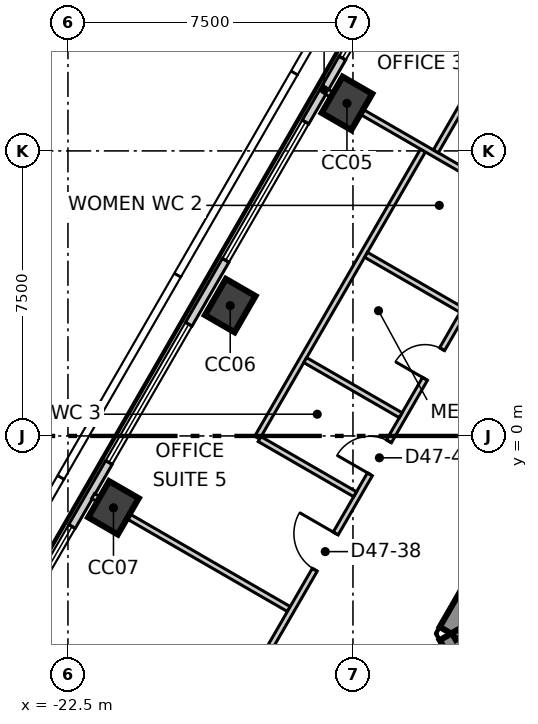
"""IFC4 building model, lengths in metres.
Left out: names, types, materials, properties, quantities, classifications, styles, units other than length and angle.
Written with IfcOpenShell. Run it as: python <this file> out.ifc"""

import sys

from ifc_helpers import new_model, si_unit, direction, frame, frame_2d, origin, origin_2d, place, context, subcontext, project, spatial, polyline, rectangle, outline, extrude, element, fill, save


model = new_model("IFC4")
c1 = context("Model", 3, precision=1e-05, world=origin(), true_north=direction((0.0, 1.0)))
c2 = subcontext(c1, "Body", "Model", "MODEL_VIEW")
j1 = project(units=[si_unit("LENGTHUNIT", "METRE"), si_unit("PLANEANGLEUNIT", "RADIAN")], contexts=[c1])
p1 = place(None, origin())
s1 = spatial("IfcSite", under=j1, at=p1, CompositionType="ELEMENT")
p2 = place(p1, origin())
s2 = spatial("IfcBuilding", under=s1, at=p2, CompositionType="ELEMENT")
p3 = place(p2, frame((0.0, 0.0, 203.3)))
s3 = spatial("IfcBuildingStorey", under=s2, at=p3, CompositionType="ELEMENT", Elevation=203.3)
p4 = place(p3, frame((-1.703, 13.35, -0.3), z_axis=(0.0, 0.0, 1.0), x_axis=(-0.500011533395, -0.866018744874, 0.0)))
e1 = element("IfcWall", 1, at=p4, inside=s3, PredefinedType="SHEAR", context=c2, shape_type="SweptSolid", body=[
    extrude(outline(polyline([(-0.202, -0.35), (1.782, -0.35), (3.766, -0.35), (5.75, -0.35), (7.734, -0.35), (9.718, -0.35), (11.702, -0.35), (13.686, -0.35), (15.67, -0.35), (17.654, -0.35), (19.638, -0.35), (21.622, -0.35), (21.218, 0.35), (19.307, 0.35), (17.397, 0.35), (15.486, 0.35), (13.576, 0.35), (11.665, 0.35), (9.755, 0.35), (7.844, 0.35), (5.934, 0.35), (4.023, 0.35), (2.113, 0.35), (0.202, 0.35), (-0.202, -0.35)])), origin(), (0.0, 0.0, 1.0), 4.0),
])
p5 = place(p4, frame((10.16, 0.0, 0.3)))
e2 = element("IfcOpeningElement", 2, at=p5, cuts=e1, PredefinedType="OPENING", context=c2, shape_type="SweptSolid", body=[
    extrude(rectangle(XDim=1.1, YDim=2.1, at=frame_2d((0.55, 1.05))), frame((0.0, 0.36, 0.0), z_axis=(0.0, -1.0, 0.0), x_axis=(1.0, 0.0, 0.0)), (0.0, 0.0, 1.0), 0.72),
])
p6 = place(p4, frame((4.055, 0.0, 0.3)))
e3 = element("IfcOpeningElement", 3, at=p6, cuts=e1, PredefinedType="OPENING", context=c2, shape_type="SweptSolid", body=[
    extrude(rectangle(XDim=0.9, YDim=2.1, at=frame_2d((0.45, 1.05))), frame((0.0, 0.36, 0.0), z_axis=(0.0, -1.0, 0.0), x_axis=(1.0, 0.0, 0.0)), (0.0, 0.0, 1.0), 0.72),
])
p7 = place(p3, frame((-12.413, -5.2, -0.3), z_axis=(0.0, 0.0, 1.0), x_axis=(0.49999337185, -0.866029230515, 0.0)))
e4 = element("IfcWall", 4, at=p7, inside=s3, PredefinedType="SHEAR", context=c2, shape_type="SweptSolid", body=[
    extrude(outline(polyline([(-0.202, -0.35), (1.703, -0.35), (3.608, -0.35), (3.204, 0.35), (1.703, 0.35), (0.202, 0.35), (-0.202, -0.35)])), origin(), (0.0, 0.0, 1.0), 4.0),
])
p8 = place(p7, frame((1.003, 0.0, 0.3)))
e5 = element("IfcOpeningElement", 5, at=p8, cuts=e4, PredefinedType="OPENING", context=c2, shape_type="SweptSolid", body=[
    extrude(rectangle(XDim=1.4, YDim=2.1, at=frame_2d((0.7, 1.05))), frame((0.0, 0.36, 0.0), z_axis=(0.0, -1.0, 0.0), x_axis=(1.0, 0.0, 0.0)), (0.0, 0.0, 1.0), 0.72),
])
for number, where, z_axis, x_axis in (
    (6, (-15.158, 8.751, -0.3), (0.0, 0.0, 1.0), (0.5, 0.866, 0.0)),
    (7, (-18.23, 3.43, -0.3), (0.0, 0.0, 1.0), (0.5, 0.866, 0.0)),
    (8, (-21.302, -1.891, -0.3), (0.0, 0.0, 1.0), (0.5, 0.866, 0.0)),
):
    element("IfcColumn", number, at=place(p3, frame(where, z_axis=z_axis, x_axis=x_axis)), inside=s3, PredefinedType="COLUMN", context=c2, shape_type="SweptSolid", body=[
        extrude(rectangle(XDim=1.1, YDim=0.9, at=origin_2d()), origin(), (0.0, 0.0, 1.0), 4.0),
    ])
p9 = place(p3, frame((-2.824, 31.513, 0.0), z_axis=(0.0, 0.0, 1.0), x_axis=(-0.500012324412, -0.866018288165, 0.0)))
e9 = element("IfcWall", 9, at=p9, inside=s3, PredefinedType="ELEMENTEDWALL", context=c2, shape_type="SweptSolid", body=[
    extrude(rectangle(XDim=51.739, YDim=0.2, at=frame_2d((25.87, 0.0))), origin(), (0.0, 0.0, 1.0), 3.7),
])
p10 = place(p9, frame((2.275, 0.0, 0.9)))
e10 = element("IfcOpeningElement", 10, at=p10, cuts=e9, PredefinedType="OPENING", context=c2, shape_type="SweptSolid", body=[
    extrude(rectangle(XDim=4.2, YDim=2.5, at=frame_2d((2.1, 1.25))), frame((0.0, 0.11, 0.0), z_axis=(0.0, -1.0, 0.0), x_axis=(1.0, 0.0, 0.0)), (0.0, 0.0, 1.0), 0.22),
])
p11 = place(p9, frame((8.419, 0.0, 0.9)))
e11 = element("IfcOpeningElement", 11, at=p11, cuts=e9, PredefinedType="OPENING", context=c2, shape_type="SweptSolid", body=[
    extrude(rectangle(XDim=4.2, YDim=2.5, at=frame_2d((2.1, 1.25))), frame((0.0, 0.11, 0.0), z_axis=(0.0, -1.0, 0.0), x_axis=(1.0, 0.0, 0.0)), (0.0, 0.0, 1.0), 0.22),
])
p12 = place(p9, frame((14.563, 0.0, 0.9)))
e12 = element("IfcOpeningElement", 12, at=p12, cuts=e9, PredefinedType="OPENING", context=c2, shape_type="SweptSolid", body=[
    extrude(rectangle(XDim=4.2, YDim=2.5, at=frame_2d((2.1, 1.25))), frame((0.0, 0.11, 0.0), z_axis=(0.0, -1.0, 0.0), x_axis=(1.0, 0.0, 0.0)), (0.0, 0.0, 1.0), 0.22),
])
p13 = place(p9, frame((20.707, 0.0, 0.9)))
e13 = element("IfcOpeningElement", 13, at=p13, cuts=e9, PredefinedType="OPENING", context=c2, shape_type="SweptSolid", body=[
    extrude(rectangle(XDim=4.2, YDim=2.5, at=frame_2d((2.1, 1.25))), frame((0.0, 0.11, 0.0), z_axis=(0.0, -1.0, 0.0), x_axis=(1.0, 0.0, 0.0)), (0.0, 0.0, 1.0), 0.22),
])
p14 = place(p9, frame((26.851, 0.0, 0.9)))
e14 = element("IfcOpeningElement", 14, at=p14, cuts=e9, PredefinedType="OPENING", context=c2, shape_type="SweptSolid", body=[
    extrude(rectangle(XDim=4.2, YDim=2.5, at=frame_2d((2.1, 1.25))), frame((0.0, 0.11, 0.0), z_axis=(0.0, -1.0, 0.0), x_axis=(1.0, 0.0, 0.0)), (0.0, 0.0, 1.0), 0.22),
])
p15 = place(p9, frame((32.995, 0.0, 0.9)))
e15 = element("IfcOpeningElement", 15, at=p15, cuts=e9, PredefinedType="OPENING", context=c2, shape_type="SweptSolid", body=[
    extrude(rectangle(XDim=4.2, YDim=2.5, at=frame_2d((2.1, 1.25))), frame((0.0, 0.11, 0.0), z_axis=(0.0, -1.0, 0.0), x_axis=(1.0, 0.0, 0.0)), (0.0, 0.0, 1.0), 0.22),
])
p16 = place(p9, frame((39.14, 0.0, 0.9)))
e16 = element("IfcOpeningElement", 16, at=p16, cuts=e9, PredefinedType="OPENING", context=c2, shape_type="SweptSolid", body=[
    extrude(rectangle(XDim=4.2, YDim=2.5, at=frame_2d((2.1, 1.25))), frame((0.0, 0.11, 0.0), z_axis=(0.0, -1.0, 0.0), x_axis=(1.0, 0.0, 0.0)), (0.0, 0.0, 1.0), 0.22),
])
p17 = place(p9, frame((45.284, 0.0, 0.9)))
e17 = element("IfcOpeningElement", 17, at=p17, cuts=e9, PredefinedType="OPENING", context=c2, shape_type="SweptSolid", body=[
    extrude(rectangle(XDim=4.2, YDim=2.5, at=frame_2d((2.1, 1.25))), frame((0.0, 0.11, 0.0), z_axis=(0.0, -1.0, 0.0), x_axis=(1.0, 0.0, 0.0)), (0.0, 0.0, 1.0), 0.22),
])
p18 = place(p3, frame((-21.839, -1.581, 0.0), z_axis=(0.0, 0.0, 1.0), x_axis=(0.866034527326, -0.49998419723, 0.0)))
e18 = element("IfcWall", 18, at=p18, inside=s3, PredefinedType="PARTITIONING", context=c2, shape_type="SweptSolid", body=[
    extrude(rectangle(XDim=5.948, YDim=0.15, at=frame_2d((2.974, 0.0))), origin(), (0.0, 0.0, 1.0), 3.7),
])
p19 = place(p3, frame((-20.883, -11.97, 0.0), z_axis=(0.0, 0.0, 1.0), x_axis=(0.500006150555, 0.866021852731, 0.0)))
e19 = element("IfcWall", 19, at=p19, inside=s3, PredefinedType="PARTITIONING", context=c2, shape_type="SweptSolid", body=[
    extrude(rectangle(XDim=41.766, YDim=0.15, at=frame_2d((20.883, 0.0))), origin(), (0.0, 0.0, 1.0), 3.7),
])
p20 = place(p19, frame((36.916, 0.0, 0.0)))
e20 = element("IfcOpeningElement", 20, at=p20, cuts=e19, PredefinedType="OPENING", context=c2, shape_type="SweptSolid", body=[
    extrude(rectangle(XDim=1.1, YDim=2.1, at=frame_2d((0.55, 1.05))), frame((0.0, 0.085, 0.0), z_axis=(0.0, -1.0, 0.0), x_axis=(1.0, 0.0, 0.0)), (0.0, 0.0, 1.0), 0.17),
])
p21 = place(p19, frame((26.446, 0.0, 0.0)))
e21 = element("IfcOpeningElement", 21, at=p21, cuts=e19, PredefinedType="OPENING", context=c2, shape_type="SweptSolid", body=[
    extrude(rectangle(XDim=1.1, YDim=2.1, at=frame_2d((0.55, 1.05))), frame((0.0, 0.085, 0.0), z_axis=(0.0, -1.0, 0.0), x_axis=(1.0, 0.0, 0.0)), (0.0, 0.0, 1.0), 0.17),
])
p22 = place(p19, frame((9.757, 0.0, 0.0)))
e22 = element("IfcOpeningElement", 22, at=p22, cuts=e19, PredefinedType="OPENING", context=c2, shape_type="SweptSolid", body=[
    extrude(rectangle(XDim=1.1, YDim=2.1, at=frame_2d((0.55, 1.05))), frame((0.0, 0.085, 0.0), z_axis=(0.0, -1.0, 0.0), x_axis=(1.0, 0.0, 0.0)), (0.0, 0.0, 1.0), 0.17),
])
p23 = place(p19, frame((18.757, 0.0, 0.0)))
e23 = element("IfcOpeningElement", 23, at=p23, cuts=e19, PredefinedType="OPENING", context=c2, shape_type="SweptSolid", body=[
    extrude(rectangle(XDim=0.9, YDim=2.1, at=frame_2d((0.45, 1.05))), frame((0.0, 0.085, 0.0), z_axis=(0.0, -1.0, 0.0), x_axis=(1.0, 0.0, 0.0)), (0.0, 0.0, 1.0), 0.17),
])
p24 = place(p19, frame((15.557, 0.0, 0.0)))
e24 = element("IfcOpeningElement", 24, at=p24, cuts=e19, PredefinedType="OPENING", context=c2, shape_type="SweptSolid", body=[
    extrude(rectangle(XDim=0.9, YDim=2.1, at=frame_2d((0.45, 1.05))), frame((0.0, 0.085, 0.0), z_axis=(0.0, -1.0, 0.0), x_axis=(1.0, 0.0, 0.0)), (0.0, 0.0, 1.0), 0.17),
])
p25 = place(p19, frame((12.657, 0.0, 0.0)))
e25 = element("IfcOpeningElement", 25, at=p25, cuts=e19, PredefinedType="OPENING", context=c2, shape_type="SweptSolid", body=[
    extrude(rectangle(XDim=1.0, YDim=2.1, at=frame_2d((0.5, 1.05))), frame((0.0, 0.085, 0.0), z_axis=(0.0, -1.0, 0.0), x_axis=(1.0, 0.0, 0.0)), (0.0, 0.0, 1.0), 0.17),
])
p26 = place(p19, frame((3.669, 0.0, 0.0)))
e26 = element("IfcOpeningElement", 26, at=p26, cuts=e19, PredefinedType="OPENING", context=c2, shape_type="SweptSolid", body=[
    extrude(rectangle(XDim=1.1, YDim=2.1, at=frame_2d((0.55, 1.05))), frame((0.0, 0.085, 0.0), z_axis=(0.0, -1.0, 0.0), x_axis=(1.0, 0.0, 0.0)), (0.0, 0.0, 1.0), 0.17),
])
p27 = place(p3, frame((-17.521, -0.046, 0.0), z_axis=(0.0, 0.0, 1.0), x_axis=(0.499970334739, 0.866042530354, 0.0)))
e27 = element("IfcWall", 27, at=p27, inside=s3, PredefinedType="PARTITIONING", context=c2, shape_type="SweptSolid", body=[
    extrude(rectangle(XDim=8.725, YDim=0.15, at=frame_2d((4.362, 0.0))), origin(), (0.0, 0.0, 1.0), 3.7),
])
p28 = place(p3, frame((-17.456, -0.083, 0.0), z_axis=(0.0, 0.0, 1.0), x_axis=(0.865929066901, -0.500166823267, 0.0)))
e28 = element("IfcWall", 28, at=p28, inside=s3, PredefinedType="PARTITIONING", context=c2, shape_type="SweptSolid", body=[
    extrude(rectangle(XDim=2.901, YDim=0.15, at=frame_2d((1.45, 0.0))), origin(), (0.0, 0.0, 1.0), 3.7),
])
p29 = place(p3, frame((-16.256, 1.995, 0.0), z_axis=(0.0, 0.0, 1.0), x_axis=(0.866059450854, -0.499941024108, 0.0)))
e29 = element("IfcWall", 29, at=p29, inside=s3, PredefinedType="PARTITIONING", context=c2, shape_type="SweptSolid", body=[
    extrude(rectangle(XDim=2.901, YDim=0.15, at=frame_2d((1.45, 0.0))), origin(), (0.0, 0.0, 1.0), 3.7),
])
p30 = place(p3, frame((-15.695, 9.061, 0.0), z_axis=(0.0, 0.0, 1.0), x_axis=(0.866016753976, -0.500014981608, 0.0)))
e30 = element("IfcWall", 30, at=p30, inside=s3, PredefinedType="PARTITIONING", context=c2, shape_type="SweptSolid", body=[
    extrude(rectangle(XDim=5.948, YDim=0.15, at=frame_2d((2.974, 0.0))), origin(), (0.0, 0.0, 1.0), 3.2),
])
p31 = place(p3, frame((-14.656, 4.766, 0.0), z_axis=(0.0, 0.0, 1.0), x_axis=(0.866038412228, -0.499977468037, 0.0)))
e31 = element("IfcWall", 31, at=p31, inside=s3, PredefinedType="PARTITIONING", context=c2, shape_type="SweptSolid", body=[
    extrude(rectangle(XDim=2.901, YDim=0.15, at=frame_2d((1.45, 0.0))), origin(), (0.0, 0.0, 1.0), 3.7),
])
p32 = place(p3, frame((-12.82, 7.488, 0.0), z_axis=(0.0, 0.0, 1.0), x_axis=(0.500060781096, 0.865990308958, 0.0)))
e32 = element("IfcWall", 32, at=p32, inside=s3, PredefinedType="PARTITIONING", context=c2, shape_type="SweptSolid", body=[
    extrude(rectangle(XDim=12.139, YDim=0.15, at=frame_2d((6.069, 0.0))), origin(), (0.0, 0.0, 1.0), 3.7),
])
p33 = place(p32, frame((5.564, 0.0, 0.0)))
e33 = element("IfcOpeningElement", 33, at=p33, cuts=e32, PredefinedType="OPENING", context=c2, shape_type="SweptSolid", body=[
    extrude(rectangle(XDim=1.0, YDim=2.1, at=frame_2d((0.5, 1.05))), frame((0.0, 0.085, 0.0), z_axis=(0.0, -1.0, 0.0), x_axis=(1.0, 0.0, 0.0)), (0.0, 0.0, 1.0), 0.17),
])
p34 = place(p3, frame((-12.344, -5.279, 0.0), z_axis=(0.0, 0.0, 1.0), x_axis=(0.866046323291, 0.499963764601, 0.0)))
e34 = element("IfcWall", 34, at=p34, inside=s3, PredefinedType="SOLIDWALL", context=c2, shape_type="SweptSolid", body=[
    extrude(rectangle(XDim=6.714, YDim=0.2, at=frame_2d((3.357, 0.0))), origin(), (0.0, 0.0, 1.0), 3.7),
])
p35 = place(p13, origin())
e35 = element("IfcWindow", 35, at=p35, inside=s3, PartitioningType="SINGLE_PANEL", PredefinedType="WINDOW", context=c2, shape_type="SweptSolid", body=[
    extrude(rectangle(XDim=4.2, YDim=2.5, at=frame_2d((2.1, 1.25))), frame((0.0, 0.03, 0.0), z_axis=(0.0, -1.0, 0.0), x_axis=(1.0, 0.0, 0.0)), (0.0, 0.0, 1.0), 0.06),
])
fill(e13, e35)
p36 = place(p14, origin())
e36 = element("IfcWindow", 36, at=p36, inside=s3, PartitioningType="SINGLE_PANEL", PredefinedType="WINDOW", context=c2, shape_type="SweptSolid", body=[
    extrude(rectangle(XDim=4.2, YDim=2.5, at=frame_2d((2.1, 1.25))), frame((0.0, 0.03, 0.0), z_axis=(0.0, -1.0, 0.0), x_axis=(1.0, 0.0, 0.0)), (0.0, 0.0, 1.0), 0.06),
])
fill(e14, e36)
p37 = place(p15, origin())
e37 = element("IfcWindow", 37, at=p37, inside=s3, PartitioningType="SINGLE_PANEL", PredefinedType="WINDOW", context=c2, shape_type="SweptSolid", body=[
    extrude(rectangle(XDim=4.2, YDim=2.5, at=frame_2d((2.1, 1.25))), frame((0.0, 0.03, 0.0), z_axis=(0.0, -1.0, 0.0), x_axis=(1.0, 0.0, 0.0)), (0.0, 0.0, 1.0), 0.06),
])
fill(e15, e37)
p38 = place(p16, origin())
e38 = element("IfcWindow", 38, at=p38, inside=s3, PartitioningType="SINGLE_PANEL", PredefinedType="WINDOW", context=c2, shape_type="SweptSolid", body=[
    extrude(rectangle(XDim=4.2, YDim=2.5, at=frame_2d((2.1, 1.25))), frame((0.0, 0.03, 0.0), z_axis=(0.0, -1.0, 0.0), x_axis=(1.0, 0.0, 0.0)), (0.0, 0.0, 1.0), 0.06),
])
fill(e16, e38)
p39 = place(p22, origin())
e39 = element("IfcDoor", 39, at=p39, inside=s3, OperationType="SINGLE_SWING_LEFT", PredefinedType="DOOR", context=c2, shape_type="SweptSolid", body=[
    extrude(rectangle(XDim=1.1, YDim=2.1, at=frame_2d((0.55, 1.05))), frame((0.0, 0.025, 0.0), z_axis=(0.0, -1.0, 0.0), x_axis=(1.0, 0.0, 0.0)), (0.0, 0.0, 1.0), 0.05),
])
fill(e22, e39)
p40 = place(p24, origin())
e40 = element("IfcDoor", 40, at=p40, inside=s3, OperationType="SINGLE_SWING_RIGHT", PredefinedType="DOOR", context=c2, shape_type="SweptSolid", body=[
    extrude(rectangle(XDim=0.9, YDim=2.1, at=frame_2d((0.45, 1.05))), frame((0.0, 0.025, 0.0), z_axis=(0.0, -1.0, 0.0), x_axis=(1.0, 0.0, 0.0)), (0.0, 0.0, 1.0), 0.05),
])
fill(e24, e40)
p41 = place(p25, origin())
e41 = element("IfcDoor", 41, at=p41, inside=s3, OperationType="SINGLE_SWING_RIGHT", PredefinedType="DOOR", context=c2, shape_type="SweptSolid", body=[
    extrude(rectangle(XDim=1.0, YDim=2.1, at=frame_2d((0.5, 1.05))), frame((0.0, 0.025, 0.0), z_axis=(0.0, -1.0, 0.0), x_axis=(1.0, 0.0, 0.0)), (0.0, 0.0, 1.0), 0.05),
])
fill(e25, e41)
save(model, sys.argv[1])
